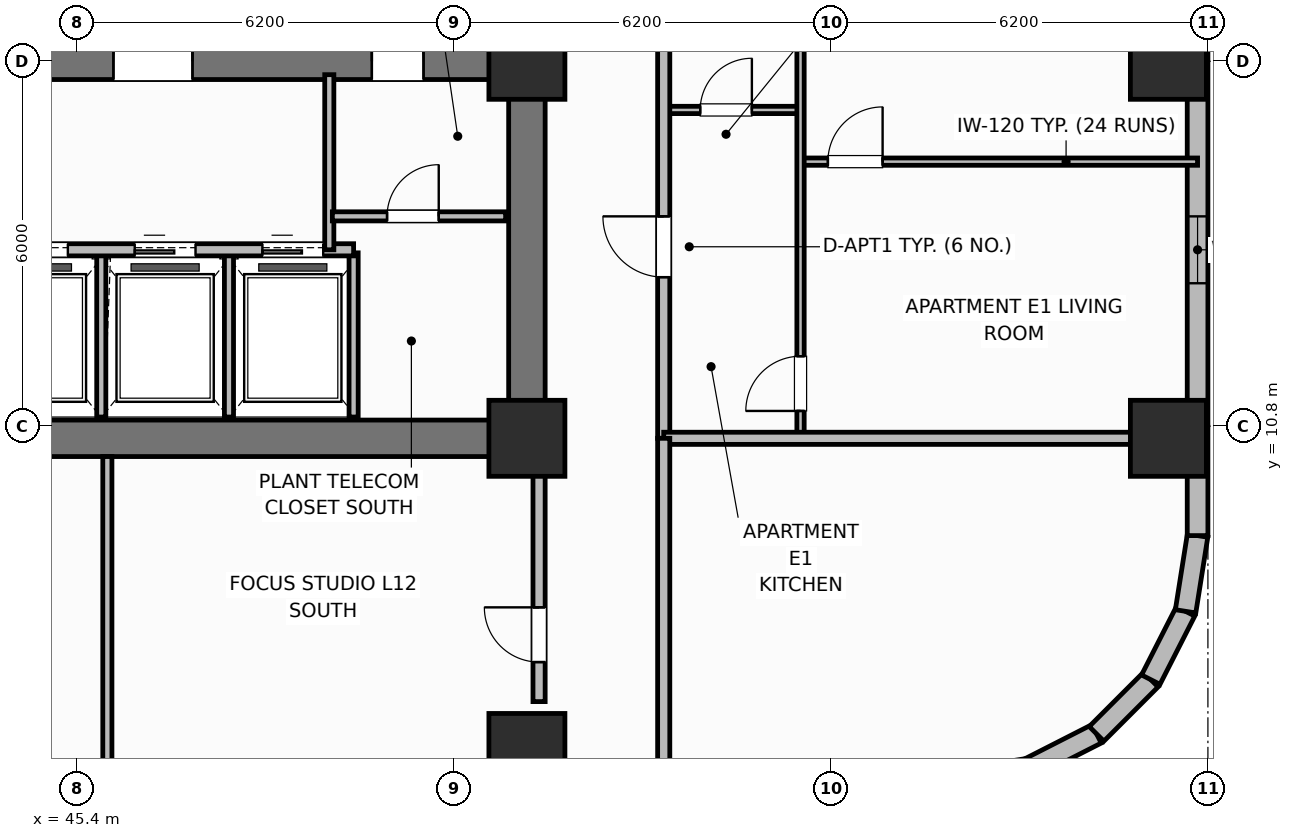
"""IFC4 building model, lengths in metres.
Left out: names, types, materials, properties, quantities, classifications, styles, units other than length and angle.
Written with IfcOpenShell. Run it as: python <this file> out.ifc"""

import sys

from ifc_helpers import new_model, si_unit, direction, frame, frame_2d, origin, origin_2d, place, context, subcontext, project, spatial, rectangle, extrude, element, fill, save


model = new_model("IFC4")
c1 = context("Model", 3, precision=1e-05, world=origin(), true_north=direction((0.0, 1.0)))
c2 = subcontext(c1, "Body", "Model", "MODEL_VIEW")
j1 = project(units=[si_unit("LENGTHUNIT", "METRE"), si_unit("PLANEANGLEUNIT", "RADIAN")], contexts=[c1])
p1 = place(None, origin())
s1 = spatial("IfcSite", under=j1, at=p1, CompositionType="ELEMENT")
p2 = place(p1, origin())
s2 = spatial("IfcBuilding", under=s1, at=p2, CompositionType="ELEMENT")
p3 = place(p2, frame((0.0, 0.0, 51.0)))
s3 = spatial("IfcBuildingStorey", under=s2, at=p3, CompositionType="ELEMENT", Elevation=51.0)
p4 = place(p3, frame((52.8, 10.6, 0.0), z_axis=(0.0, 0.0, 1.0), x_axis=(-1.0, 0.0, 0.0)))
e1 = element("IfcWall", 1, at=p4, inside=s3, PredefinedType="SHEAR", context=c2, shape_type="SweptSolid", body=[
    extrude(rectangle(XDim=27.2, YDim=0.6, at=frame_2d((13.6, 0.0))), origin(), (0.0, 0.0, 1.0), 3.7),
])
p5 = place(p3, frame((52.8, 10.9, 0.0), z_axis=(0.0, 0.0, 1.0), x_axis=(0.0, 1.0, 0.0)))
e2 = element("IfcWall", 2, at=p5, inside=s3, PredefinedType="SHEAR", context=c2, shape_type="SweptSolid", body=[
    extrude(rectangle(XDim=5.6, YDim=0.6, at=frame_2d((2.8, 0.0))), origin(), (0.0, 0.0, 1.0), 3.7),
])
p6 = place(p3, frame((25.6, 16.8, 0.0), z_axis=(0.0, 0.0, 1.0), x_axis=(1.0, 0.0, 0.0)))
e3 = element("IfcWall", 3, at=p6, inside=s3, PredefinedType="SHEAR", context=c2, shape_type="SweptSolid", body=[
    extrude(rectangle(XDim=27.2, YDim=0.6, at=frame_2d((13.6, 0.0))), origin(), (0.0, 0.0, 1.0), 3.7),
])
p7 = place(p6, frame((1.8, 0.0, 0.0)))
e4 = element("IfcOpeningElement", 4, at=p7, cuts=e3, PredefinedType="OPENING", context=c2, shape_type="SweptSolid", body=[
    extrude(rectangle(XDim=1.1, YDim=2.15, at=frame_2d((0.55, 1.075))), frame((0.0, 0.31, 0.0), z_axis=(0.0, -1.0, 0.0), x_axis=(1.0, 0.0, 0.0)), (0.0, 0.0, 1.0), 0.62),
])
p8 = place(p6, frame((5.6, 0.0, 0.0)))
e5 = element("IfcOpeningElement", 5, at=p8, cuts=e3, PredefinedType="OPENING", context=c2, shape_type="SweptSolid", body=[
    extrude(rectangle(XDim=0.85, YDim=2.1, at=frame_2d((0.425, 1.05))), frame((0.0, 0.31, 0.0), z_axis=(0.0, -1.0, 0.0), x_axis=(1.0, 0.0, 0.0)), (0.0, 0.0, 1.0), 0.62),
])
p9 = place(p6, frame((13.0, 0.0, 0.0)))
e6 = element("IfcOpeningElement", 6, at=p9, cuts=e3, PredefinedType="OPENING", context=c2, shape_type="SweptSolid", body=[
    extrude(rectangle(XDim=1.2, YDim=2.15, at=frame_2d((0.6, 1.075))), frame((0.0, 0.31, 0.0), z_axis=(0.0, -1.0, 0.0), x_axis=(1.0, 0.0, 0.0)), (0.0, 0.0, 1.0), 0.62),
])
p10 = place(p6, frame((20.4, 0.0, 0.0)))
e7 = element("IfcOpeningElement", 7, at=p10, cuts=e3, PredefinedType="OPENING", context=c2, shape_type="SweptSolid", body=[
    extrude(rectangle(XDim=1.3, YDim=2.2, at=frame_2d((0.65, 1.1))), frame((0.0, 0.31, 0.0), z_axis=(0.0, -1.0, 0.0), x_axis=(1.0, 0.0, 0.0)), (0.0, 0.0, 1.0), 0.62),
])
p11 = place(p6, frame((24.65, 0.0, 0.0)))
e8 = element("IfcOpeningElement", 8, at=p11, cuts=e3, PredefinedType="OPENING", context=c2, shape_type="SweptSolid", body=[
    extrude(rectangle(XDim=0.85, YDim=2.1, at=frame_2d((0.425, 1.05))), frame((0.0, 0.31, 0.0), z_axis=(0.0, -1.0, 0.0), x_axis=(1.0, 0.0, 0.0)), (0.0, 0.0, 1.0), 0.62),
])
for number, where, z_axis, x_axis in (
    (9, (52.8, 10.6, 0.0), (0.0, 0.0, 1.0), (1.0, 0.0, 0.0)),
    (10, (52.8, 16.8, 0.0), (0.0, 0.0, 1.0), (1.0, 0.0, 0.0)),
    (11, (52.8, 5.45, 0.0), (0.0, 0.0, 1.0), (1.0, 0.0, 0.0)),
    (12, (63.35, 10.6, 0.0), (0.0, 0.0, 1.0), (1.0, 0.0, 0.0)),
    (13, (63.35, 16.8, 0.0), (0.0, 0.0, 1.0), (1.0, 0.0, 0.0)),
):
    element("IfcColumn", number, at=place(p3, frame(where, z_axis=z_axis, x_axis=x_axis)), inside=s3, PredefinedType="COLUMN", context=c2, shape_type="SweptSolid", body=[
        extrude(rectangle(XDim=1.25, YDim=1.25, at=origin_2d()), origin(), (0.0, 0.0, 1.0), 3.7),
    ])
p12 = place(p3, frame((59.8, 4.97, 0.0), z_axis=(0.0, 0.0, 1.0), x_axis=(0.987685918112, 0.15644975923, 0.0)))
e14 = element("IfcWall", 14, at=p12, inside=s3, PredefinedType="SOLIDWALL", context=c2, shape_type="SweptSolid", body=[
    extrude(rectangle(XDim=1.261, YDim=0.34, at=frame_2d((0.63, 0.0))), origin(), (0.0, 0.0, 1.0), 2.7),
])
for number, where, z_axis, x_axis in (
    (15, (61.045, 5.167, 0.0), (0.0, 0.0, 1.0), (0.891, 0.454, 0.0)),
    (16, (62.169, 5.74, 0.0), (0.0, 0.0, 1.0), (0.707, 0.707, 0.0)),
):
    element("IfcWall", number, at=place(p3, frame(where, z_axis=z_axis, x_axis=x_axis)), inside=s3, PredefinedType="SOLIDWALL", context=c2, shape_type="SweptSolid", body=[
        extrude(rectangle(XDim=1.261, YDim=0.34, at=frame_2d((0.63, 0.0))), origin(), (0.0, 0.0, 1.0), 2.7),
    ])
for number, where, z_axis, x_axis in (
    (17, (63.06, 6.631, 0.0), (0.0, 0.0, 1.0), (0.454, 0.891, 0.0)),
    (18, (63.633, 7.755, 0.0), (0.0, 0.0, 1.0), (0.156, 0.988, 0.0)),
):
    element("IfcWall", number, at=place(p3, frame(where, z_axis=z_axis, x_axis=x_axis)), inside=s3, PredefinedType="SOLIDWALL", context=c2, shape_type="SweptSolid", body=[
        extrude(rectangle(XDim=1.261, YDim=0.34, at=frame_2d((0.63, 0.0))), origin(), (0.0, 0.0, 1.0), 2.7),
    ])
p13 = place(p3, frame((63.83, 9.0, 0.0), z_axis=(0.0, 0.0, 1.0), x_axis=(0.0, 1.0, 0.0)))
e19 = element("IfcWall", 19, at=p13, inside=s3, PredefinedType="SOLIDWALL", context=c2, shape_type="SweptSolid", body=[
    extrude(rectangle(XDim=14.8, YDim=0.34, at=frame_2d((7.4, 0.0))), origin(), (0.0, 0.0, 1.0), 2.7),
])
p14 = place(p13, frame((4.15, 0.0, 0.93)))
e20 = element("IfcOpeningElement", 20, at=p14, cuts=e19, PredefinedType="OPENING", context=c2, shape_type="SweptSolid", body=[
    extrude(rectangle(XDim=1.1, YDim=1.65, at=frame_2d((0.55, 0.825))), frame((0.0, 0.18, 0.0), z_axis=(0.0, -1.0, 0.0), x_axis=(1.0, 0.0, 0.0)), (0.0, 0.0, 1.0), 0.36),
])
p15 = place(p13, frame((9.55, 0.0, 0.93)))
e21 = element("IfcOpeningElement", 21, at=p15, cuts=e19, PredefinedType="OPENING", context=c2, shape_type="SweptSolid", body=[
    extrude(rectangle(XDim=1.1, YDim=1.65, at=frame_2d((0.55, 0.825))), frame((0.0, 0.18, 0.0), z_axis=(0.0, -1.0, 0.0), x_axis=(1.0, 0.0, 0.0)), (0.0, 0.0, 1.0), 0.36),
])
p16 = place(p13, frame((12.25, 0.0, 0.93)))
e22 = element("IfcOpeningElement", 22, at=p16, cuts=e19, PredefinedType="OPENING", context=c2, shape_type="SweptSolid", body=[
    extrude(rectangle(XDim=1.1, YDim=1.65, at=frame_2d((0.55, 0.825))), frame((0.0, 0.18, 0.0), z_axis=(0.0, -1.0, 0.0), x_axis=(1.0, 0.0, 0.0)), (0.0, 0.0, 1.0), 0.36),
])
for number, where, z_axis, x_axis in (
    (23, (45.8, 10.95, 0.0), (0.0, 0.0, 1.0), (0.0, 1.0, 0.0)),
    (24, (47.9, 10.95, 0.0), (0.0, 0.0, 1.0), (0.0, 1.0, 0.0)),
    (25, (49.95, 10.95, 0.0), (0.0, 0.0, 1.0), (0.0, 1.0, 0.0)),
):
    element("IfcWall", number, at=place(p3, frame(where, z_axis=z_axis, x_axis=x_axis)), inside=s3, PredefinedType="PARTITIONING", context=c2, shape_type="SweptSolid", body=[
        extrude(rectangle(XDim=2.7, YDim=0.15, at=frame_2d((1.35, 0.0))), origin(), (0.0, 0.0, 1.0), 2.53),
    ])
p17 = place(p3, frame((43.55, 13.7, 0.0), z_axis=(0.0, 0.0, 1.0), x_axis=(1.0, 0.0, 0.0)))
e26 = element("IfcWall", 26, at=p17, inside=s3, PredefinedType="PARTITIONING", context=c2, shape_type="SweptSolid", body=[
    extrude(rectangle(XDim=6.4, YDim=0.2, at=frame_2d((3.2, 0.0))), origin(), (0.0, 0.0, 1.0), 2.53),
])
p18 = place(p17, frame((0.7, 0.0, 0.0)))
e27 = element("IfcOpeningElement", 27, at=p18, cuts=e26, PredefinedType="OPENING", context=c2, shape_type="SweptSolid", body=[
    extrude(rectangle(XDim=1.0, YDim=2.15, at=frame_2d((0.5, 1.075))), frame((0.0, 0.11, 0.0), z_axis=(0.0, -1.0, 0.0), x_axis=(1.0, 0.0, 0.0)), (0.0, 0.0, 1.0), 0.22),
])
p19 = place(p17, frame((2.8, 0.0, 0.0)))
e28 = element("IfcOpeningElement", 28, at=p19, cuts=e26, PredefinedType="OPENING", context=c2, shape_type="SweptSolid", body=[
    extrude(rectangle(XDim=1.0, YDim=2.15, at=frame_2d((0.5, 1.075))), frame((0.0, 0.11, 0.0), z_axis=(0.0, -1.0, 0.0), x_axis=(1.0, 0.0, 0.0)), (0.0, 0.0, 1.0), 0.22),
])
p20 = place(p17, frame((4.9, 0.0, 0.0)))
e29 = element("IfcOpeningElement", 29, at=p20, cuts=e26, PredefinedType="OPENING", context=c2, shape_type="SweptSolid", body=[
    extrude(rectangle(XDim=1.0, YDim=2.15, at=frame_2d((0.5, 1.075))), frame((0.0, 0.11, 0.0), z_axis=(0.0, -1.0, 0.0), x_axis=(1.0, 0.0, 0.0)), (0.0, 0.0, 1.0), 0.22),
])
p21 = place(p3, frame((49.55, 13.7, 0.0), z_axis=(0.0, 0.0, 1.0), x_axis=(0.0, 1.0, 0.0)))
e30 = element("IfcWall", 30, at=p21, inside=s3, PredefinedType="PARTITIONING", context=c2, shape_type="SweptSolid", body=[
    extrude(rectangle(XDim=2.88, YDim=0.15, at=frame_2d((1.44, 0.0))), origin(), (0.0, 0.0, 1.0), 2.53),
])
p22 = place(p3, frame((49.6, 14.25, 0.0), z_axis=(0.0, 0.0, 1.0), x_axis=(1.0, 0.0, 0.0)))
e31 = element("IfcWall", 31, at=p22, inside=s3, PredefinedType="PARTITIONING", context=c2, shape_type="SweptSolid", body=[
    extrude(rectangle(XDim=2.85, YDim=0.15, at=frame_2d((1.425, 0.0))), origin(), (0.0, 0.0, 1.0), 2.53),
])
p23 = place(p22, frame((0.9, 0.0, 0.0)))
e32 = element("IfcOpeningElement", 32, at=p23, cuts=e31, PredefinedType="OPENING", context=c2, shape_type="SweptSolid", body=[
    extrude(rectangle(XDim=0.85, YDim=2.1, at=frame_2d((0.425, 1.05))), frame((0.0, 0.085, 0.0), z_axis=(0.0, -1.0, 0.0), x_axis=(1.0, 0.0, 0.0)), (0.0, 0.0, 1.0), 0.17),
])
p24 = place(p3, frame((55.05, 16.0, 0.0), z_axis=(0.0, 0.0, 1.0), x_axis=(1.0, 0.0, 0.0)))
e33 = element("IfcWall", 33, at=p24, inside=s3, PredefinedType="PARTITIONING", context=c2, shape_type="SweptSolid", body=[
    extrude(rectangle(XDim=2.25, YDim=0.12, at=frame_2d((1.125, 0.0))), origin(), (0.0, 0.0, 1.0), 2.53),
])
p25 = place(p24, frame((0.6, 0.0, 0.0)))
e34 = element("IfcOpeningElement", 34, at=p25, cuts=e33, PredefinedType="OPENING", context=c2, shape_type="SweptSolid", body=[
    extrude(rectangle(XDim=0.85, YDim=2.1, at=frame_2d((0.425, 1.05))), frame((0.0, 0.07, 0.0), z_axis=(0.0, -1.0, 0.0), x_axis=(1.0, 0.0, 0.0)), (0.0, 0.0, 1.0), 0.14),
])
p26 = place(p3, frame((57.3, 15.15, 0.0), z_axis=(0.0, 0.0, 1.0), x_axis=(1.0, 0.0, 0.0)))
e35 = element("IfcWall", 35, at=p26, inside=s3, PredefinedType="PARTITIONING", context=c2, shape_type="SweptSolid", body=[
    extrude(rectangle(XDim=6.53, YDim=0.12, at=frame_2d((3.265, 0.0))), origin(), (0.0, 0.0, 1.0), 2.53),
])
p27 = place(p26, frame((0.45, 0.0, 0.0)))
e36 = element("IfcOpeningElement", 36, at=p27, cuts=e35, PredefinedType="OPENING", context=c2, shape_type="SweptSolid", body=[
    extrude(rectangle(XDim=0.9, YDim=2.1, at=frame_2d((0.45, 1.05))), frame((0.0, 0.07, 0.0), z_axis=(0.0, -1.0, 0.0), x_axis=(1.0, 0.0, 0.0)), (0.0, 0.0, 1.0), 0.14),
])
p28 = place(p3, frame((57.3, 10.64, 0.0), z_axis=(0.0, 0.0, 1.0), x_axis=(0.0, 1.0, 0.0)))
e37 = element("IfcWall", 37, at=p28, inside=s3, PredefinedType="PARTITIONING", context=c2, shape_type="SweptSolid", body=[
    extrude(rectangle(XDim=19.12, YDim=0.12, at=frame_2d((9.56, 0.0))), origin(), (0.0, 0.0, 1.0), 2.53),
])
p29 = place(p28, frame((0.41, 0.0, 0.0)))
e38 = element("IfcOpeningElement", 38, at=p29, cuts=e37, PredefinedType="OPENING", context=c2, shape_type="SweptSolid", body=[
    extrude(rectangle(XDim=0.9, YDim=2.1, at=frame_2d((0.45, 1.05))), frame((0.0, 0.07, 0.0), z_axis=(0.0, -1.0, 0.0), x_axis=(1.0, 0.0, 0.0)), (0.0, 0.0, 1.0), 0.14),
])
p30 = place(p28, frame((12.105, 0.0, 0.0)))
e39 = element("IfcOpeningElement", 39, at=p30, cuts=e37, PredefinedType="OPENING", context=c2, shape_type="SweptSolid", body=[
    extrude(rectangle(XDim=0.82, YDim=2.08, at=frame_2d((0.41, 1.04))), frame((0.0, 0.07, 0.0), z_axis=(0.0, -1.0, 0.0), x_axis=(1.0, 0.0, 0.0)), (0.0, 0.0, 1.0), 0.14),
])
p31 = place(p3, frame((55.05, 10.6, 0.0), z_axis=(0.0, 0.0, 1.0), x_axis=(0.0, 1.0, 0.0)))
e40 = element("IfcWall", 40, at=p31, inside=s3, PredefinedType="PARTITIONING", context=c2, shape_type="SweptSolid", body=[
    extrude(rectangle(XDim=35.2, YDim=0.2, at=frame_2d((17.6, 0.0))), origin(), (0.0, 0.0, 1.0), 2.53),
])
p32 = place(p31, frame((2.65, 0.0, 0.0)))
e41 = element("IfcOpeningElement", 41, at=p32, cuts=e40, PredefinedType="OPENING", context=c2, shape_type="SweptSolid", body=[
    extrude(rectangle(XDim=1.0, YDim=2.15, at=frame_2d((0.5, 1.075))), frame((0.0, 0.11, 0.0), z_axis=(0.0, -1.0, 0.0), x_axis=(1.0, 0.0, 0.0)), (0.0, 0.0, 1.0), 0.22),
])
p33 = place(p31, frame((22.75, 0.0, 0.0)))
e42 = element("IfcOpeningElement", 42, at=p33, cuts=e40, PredefinedType="OPENING", context=c2, shape_type="SweptSolid", body=[
    extrude(rectangle(XDim=1.0, YDim=2.15, at=frame_2d((0.5, 1.075))), frame((0.0, 0.11, 0.0), z_axis=(0.0, -1.0, 0.0), x_axis=(1.0, 0.0, 0.0)), (0.0, 0.0, 1.0), 0.22),
])
p34 = place(p3, frame((55.05, 10.6, 0.0), z_axis=(0.0, 0.0, 1.0), x_axis=(1.0, 0.0, 0.0)))
e43 = element("IfcWall", 43, at=p34, inside=s3, PredefinedType="PARTITIONING", context=c2, shape_type="SweptSolid", body=[
    extrude(rectangle(XDim=8.36, YDim=0.2, at=frame_2d((4.18, 0.0))), origin(), (0.0, 0.0, 1.0), 2.53),
])
p35 = place(p3, frame((55.05, 4.97, 0.0), z_axis=(0.0, 0.0, 1.0), x_axis=(0.0, 1.0, 0.0)))
e44 = element("IfcWall", 44, at=p35, inside=s3, PredefinedType="PARTITIONING", context=c2, shape_type="SweptSolid", body=[
    extrude(rectangle(XDim=5.63, YDim=0.2, at=frame_2d((2.815, 0.0))), origin(), (0.0, 0.0, 1.0), 2.53),
])
p36 = place(p3, frame((45.9, 4.97, 0.0), z_axis=(0.0, 0.0, 1.0), x_axis=(0.0, 1.0, 0.0)))
e45 = element("IfcWall", 45, at=p36, inside=s3, PredefinedType="PARTITIONING", context=c2, shape_type="SweptSolid", body=[
    extrude(rectangle(XDim=5.33, YDim=0.15, at=frame_2d((2.665, 0.0))), origin(), (0.0, 0.0, 1.0), 2.53),
])
p37 = place(p3, frame((53.0, 6.27, 0.0), z_axis=(0.0, 0.0, 1.0), x_axis=(0.0, 1.0, 0.0)))
e46 = element("IfcWall", 46, at=p37, inside=s3, PredefinedType="PARTITIONING", context=c2, shape_type="SweptSolid", body=[
    extrude(rectangle(XDim=4.03, YDim=0.2, at=frame_2d((2.015, 0.0))), origin(), (0.0, 0.0, 1.0), 2.53),
])
p38 = place(p37, frame((0.65, 0.0, 0.0)))
e47 = element("IfcOpeningElement", 47, at=p38, cuts=e46, PredefinedType="OPENING", context=c2, shape_type="SweptSolid", body=[
    extrude(rectangle(XDim=0.9, YDim=2.1, at=frame_2d((0.45, 1.05))), frame((0.0, 0.11, 0.0), z_axis=(0.0, -1.0, 0.0), x_axis=(1.0, 0.0, 0.0)), (0.0, 0.0, 1.0), 0.22),
])
p39 = place(p14, origin())
e48 = element("IfcWindow", 48, at=p39, inside=s3, PartitioningType="SINGLE_PANEL", PredefinedType="WINDOW", context=c2, shape_type="SweptSolid", body=[
    extrude(rectangle(XDim=1.1, YDim=1.65, at=frame_2d((0.55, 0.825))), frame((0.0, 0.03, 0.0), z_axis=(0.0, -1.0, 0.0), x_axis=(1.0, 0.0, 0.0)), (0.0, 0.0, 1.0), 0.06),
])
fill(e20, e48)
p40 = place(p18, origin())
e49 = element("IfcDoor", 49, at=p40, inside=s3, OperationType="SLIDING_TO_LEFT", PredefinedType="DOOR", context=c2, shape_type="SweptSolid", body=[
    extrude(rectangle(XDim=1.0, YDim=2.15, at=frame_2d((0.5, 1.075))), frame((0.0, 0.025, 0.0), z_axis=(0.0, -1.0, 0.0), x_axis=(1.0, 0.0, 0.0)), (0.0, 0.0, 1.0), 0.05),
])
fill(e27, e49)
p41 = place(p19, origin())
e50 = element("IfcDoor", 50, at=p41, inside=s3, OperationType="SLIDING_TO_LEFT", PredefinedType="DOOR", context=c2, shape_type="SweptSolid", body=[
    extrude(rectangle(XDim=1.0, YDim=2.15, at=frame_2d((0.5, 1.075))), frame((0.0, 0.025, 0.0), z_axis=(0.0, -1.0, 0.0), x_axis=(1.0, 0.0, 0.0)), (0.0, 0.0, 1.0), 0.05),
])
fill(e28, e50)
p42 = place(p20, origin())
e51 = element("IfcDoor", 51, at=p42, inside=s3, OperationType="SLIDING_TO_LEFT", PredefinedType="DOOR", context=c2, shape_type="SweptSolid", body=[
    extrude(rectangle(XDim=1.0, YDim=2.15, at=frame_2d((0.5, 1.075))), frame((0.0, 0.025, 0.0), z_axis=(0.0, -1.0, 0.0), x_axis=(1.0, 0.0, 0.0)), (0.0, 0.0, 1.0), 0.05),
])
fill(e29, e51)
p43 = place(p23, origin())
e52 = element("IfcDoor", 52, at=p43, inside=s3, OperationType="SINGLE_SWING_RIGHT", PredefinedType="DOOR", context=c2, shape_type="SweptSolid", body=[
    extrude(rectangle(XDim=0.85, YDim=2.1, at=frame_2d((0.425, 1.05))), frame((0.0, 0.025, 0.0), z_axis=(0.0, -1.0, 0.0), x_axis=(1.0, 0.0, 0.0)), (0.0, 0.0, 1.0), 0.05),
])
fill(e32, e52)
p44 = place(p25, origin())
e53 = element("IfcDoor", 53, at=p44, inside=s3, OperationType="SINGLE_SWING_RIGHT", PredefinedType="DOOR", context=c2, shape_type="SweptSolid", body=[
    extrude(rectangle(XDim=0.85, YDim=2.1, at=frame_2d((0.425, 1.05))), frame((0.0, 0.025, 0.0), z_axis=(0.0, -1.0, 0.0), x_axis=(1.0, 0.0, 0.0)), (0.0, 0.0, 1.0), 0.05),
])
fill(e34, e53)
p45 = place(p27, origin())
e54 = element("IfcDoor", 54, at=p45, inside=s3, OperationType="SINGLE_SWING_RIGHT", PredefinedType="DOOR", context=c2, shape_type="SweptSolid", body=[
    extrude(rectangle(XDim=0.9, YDim=2.1, at=frame_2d((0.45, 1.05))), frame((0.0, 0.025, 0.0), z_axis=(0.0, -1.0, 0.0), x_axis=(1.0, 0.0, 0.0)), (0.0, 0.0, 1.0), 0.05),
])
fill(e36, e54)
p46 = place(p29, origin())
e55 = element("IfcDoor", 55, at=p46, inside=s3, OperationType="SINGLE_SWING_LEFT", PredefinedType="DOOR", context=c2, shape_type="SweptSolid", body=[
    extrude(rectangle(XDim=0.9, YDim=2.1, at=frame_2d((0.45, 1.05))), frame((0.0, 0.025, 0.0), z_axis=(0.0, -1.0, 0.0), x_axis=(1.0, 0.0, 0.0)), (0.0, 0.0, 1.0), 0.05),
])
fill(e38, e55)
p47 = place(p32, origin())
e56 = element("IfcDoor", 56, at=p47, inside=s3, OperationType="SINGLE_SWING_RIGHT", PredefinedType="DOOR", context=c2, shape_type="SweptSolid", body=[
    extrude(rectangle(XDim=1.0, YDim=2.15, at=frame_2d((0.5, 1.075))), frame((0.0, 0.025, 0.0), z_axis=(0.0, -1.0, 0.0), x_axis=(1.0, 0.0, 0.0)), (0.0, 0.0, 1.0), 0.05),
])
fill(e41, e56)
p48 = place(p38, origin())
e57 = element("IfcDoor", 57, at=p48, inside=s3, OperationType="SINGLE_SWING_RIGHT", PredefinedType="DOOR", context=c2, shape_type="SweptSolid", body=[
    extrude(rectangle(XDim=0.9, YDim=2.1, at=frame_2d((0.45, 1.05))), frame((0.0, 0.025, 0.0), z_axis=(0.0, -1.0, 0.0), x_axis=(1.0, 0.0, 0.0)), (0.0, 0.0, 1.0), 0.05),
])
fill(e47, e57)
p49 = place(p10, origin())
e58 = element("IfcDoor", 58, at=p49, inside=s3, OperationType="SINGLE_SWING_RIGHT", PredefinedType="DOOR", context=c2, shape_type="SweptSolid", body=[
    extrude(rectangle(XDim=1.3, YDim=2.2, at=frame_2d((0.65, 1.1))), frame((0.0, 0.025, 0.0), z_axis=(0.0, -1.0, 0.0), x_axis=(1.0, 0.0, 0.0)), (0.0, 0.0, 1.0), 0.05),
])
fill(e7, e58)
p50 = place(p11, origin())
e59 = element("IfcDoor", 59, at=p50, inside=s3, OperationType="SINGLE_SWING_LEFT", PredefinedType="DOOR", context=c2, shape_type="SweptSolid", body=[
    extrude(rectangle(XDim=0.85, YDim=2.1, at=frame_2d((0.425, 1.05))), frame((0.0, 0.025, 0.0), z_axis=(0.0, -1.0, 0.0), x_axis=(1.0, 0.0, 0.0)), (0.0, 0.0, 1.0), 0.05),
])
fill(e8, e59)
save(model, sys.argv[1])
